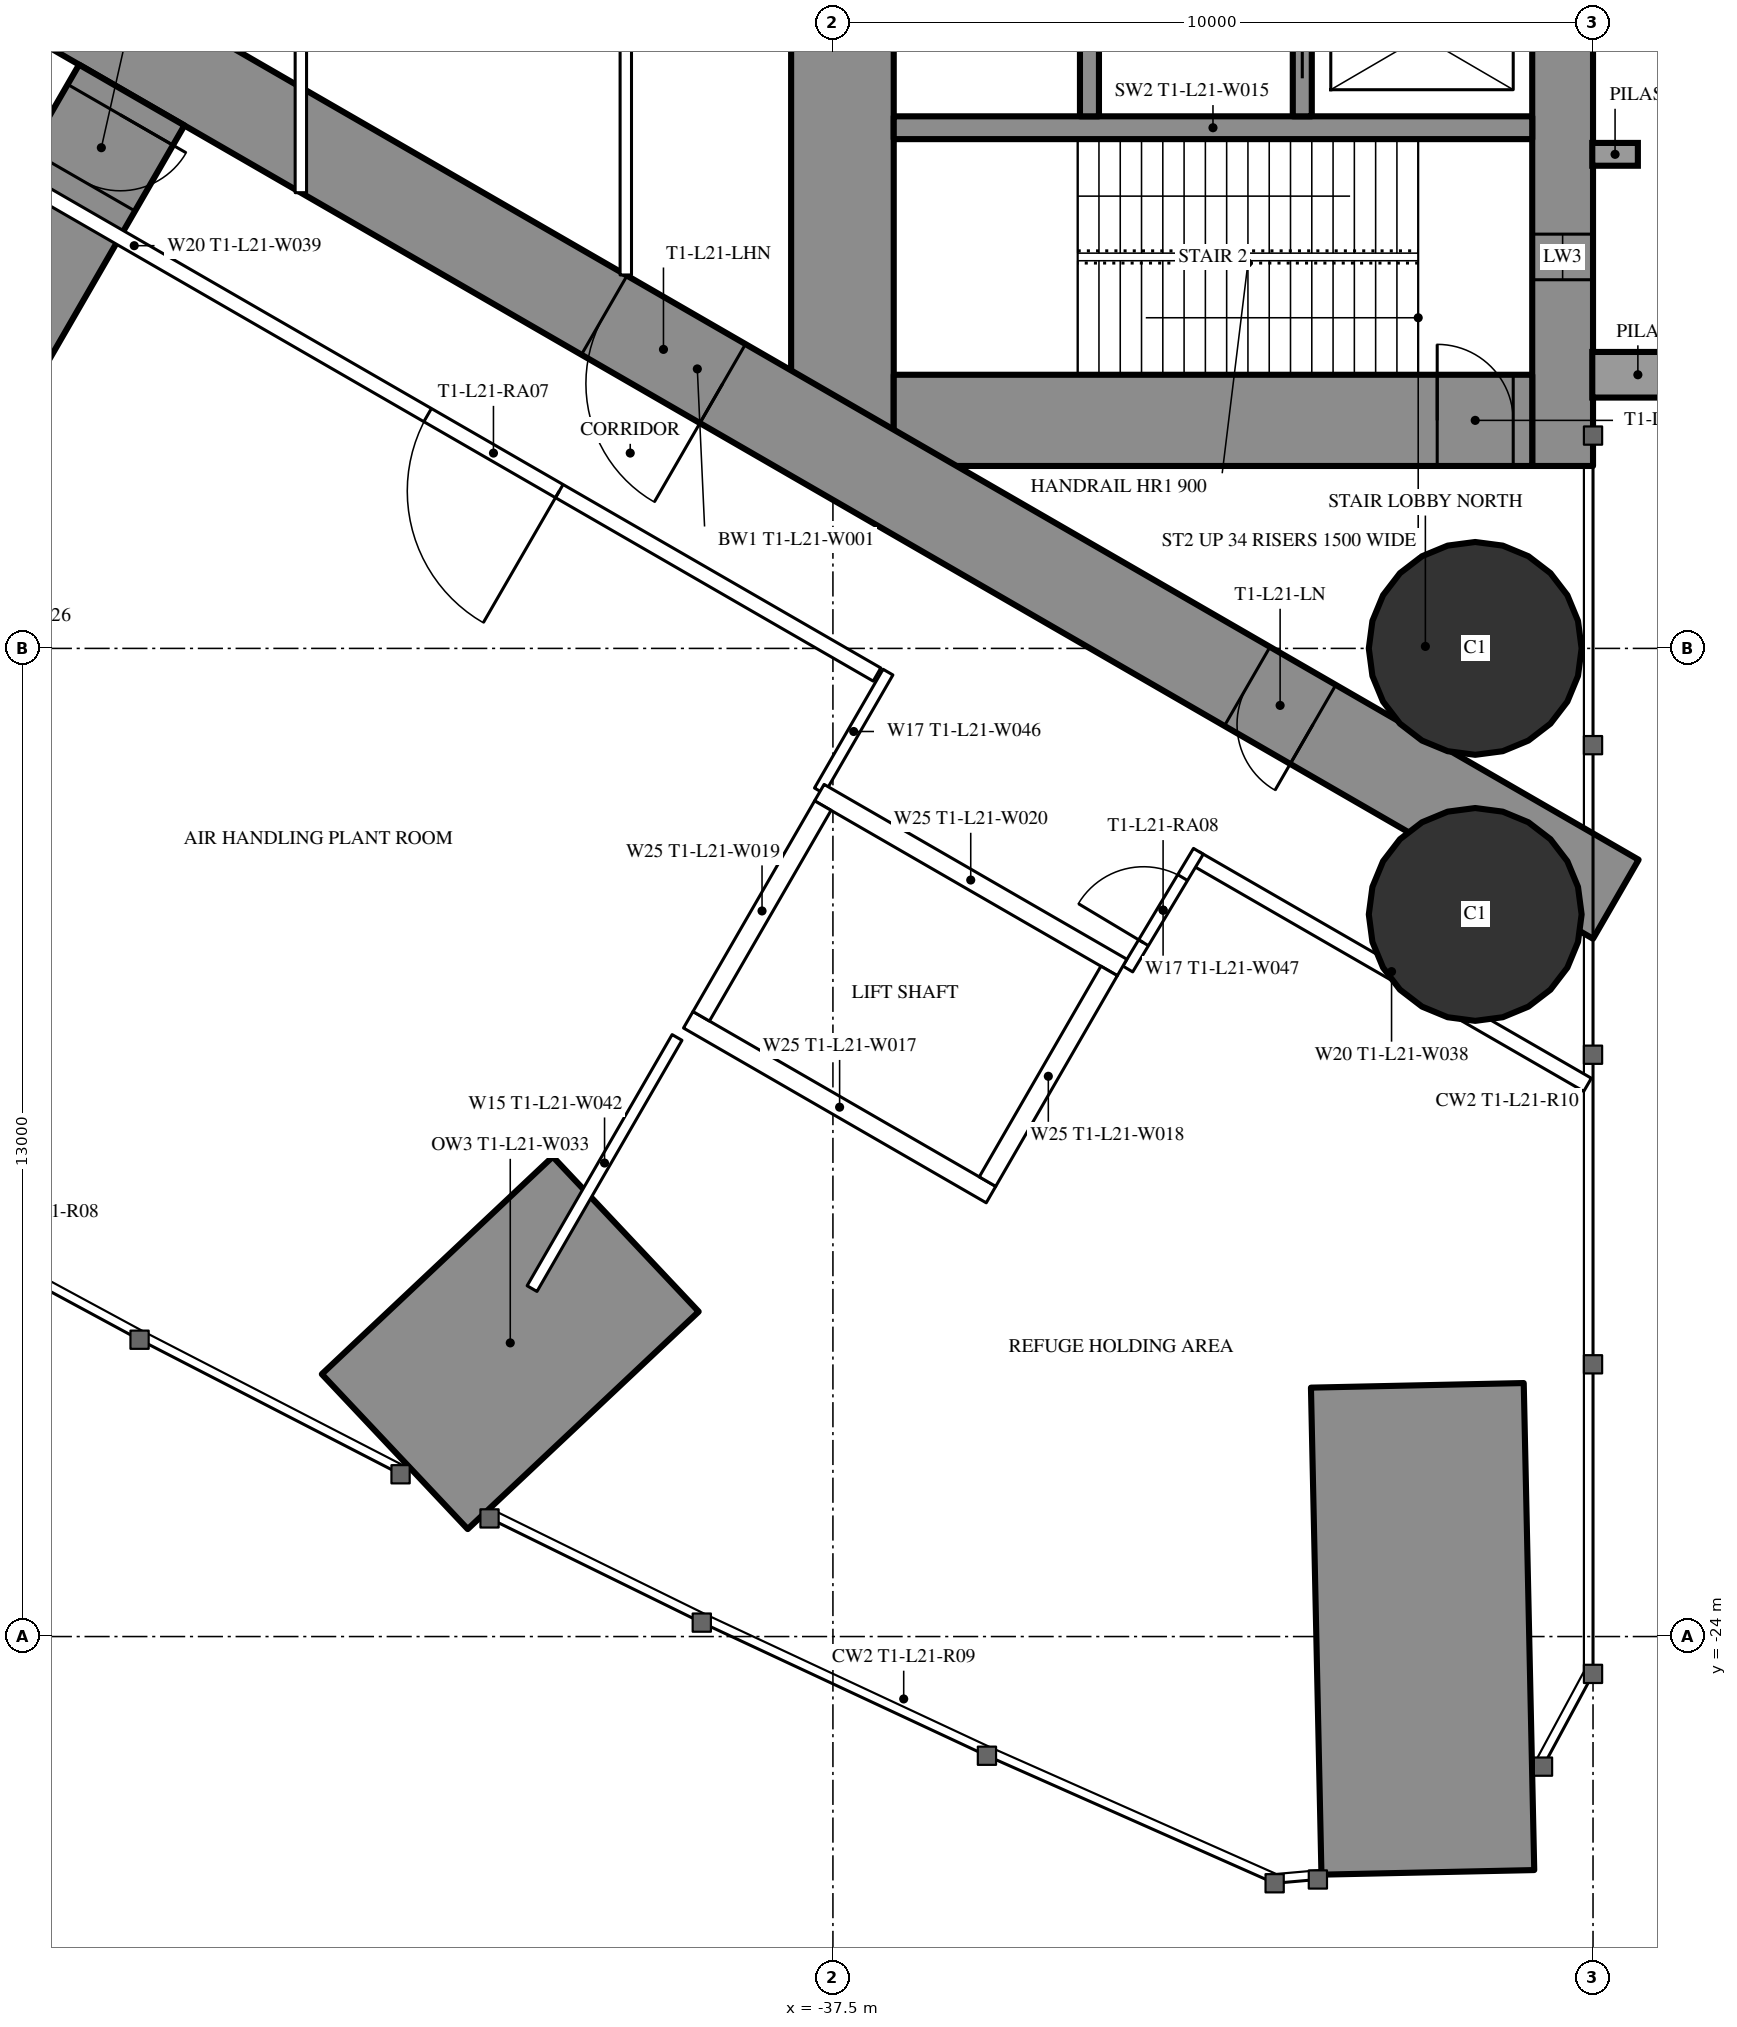
"""IFC4 building model, lengths in metres.
Left out: names, types, materials, properties, quantities, classifications, styles, units other than length and angle.
Written with IfcOpenShell. Run it as: python <this file> out.ifc"""

import sys

from ifc_helpers import new_model, si_unit, direction, frame, frame_2d, origin, origin_2d, place, context, subcontext, project, spatial, rectangle, hollow_circle, extrude, element, fill, save


model = new_model("IFC4")
c1 = context("Model", 3, precision=1e-05, world=origin(), true_north=direction((0.0, 1.0)))
c2 = subcontext(c1, "Body", "Model", "MODEL_VIEW")
j1 = project(units=[si_unit("LENGTHUNIT", "METRE"), si_unit("PLANEANGLEUNIT", "RADIAN")], contexts=[c1])
p1 = place(None, origin())
s1 = spatial("IfcSite", under=j1, at=p1, CompositionType="ELEMENT")
p2 = place(p1, origin())
s2 = spatial("IfcBuilding", under=s1, at=p2, CompositionType="ELEMENT")
p3 = place(p2, frame((0.0, 0.0, 81.0)))
s3 = spatial("IfcBuildingStorey", under=s2, at=p3, CompositionType="ELEMENT", Elevation=81.0)
p4 = place(p3, frame((-29.673, -27.102, 0.0), z_axis=(0.0, 0.0, 1.0), x_axis=(-0.0215618204, 0.999767516926, 0.0)))
e1 = element("IfcWall", 1, at=p4, inside=s3, PredefinedType="SHEAR", context=c2, shape_type="SweptSolid", body=[
    extrude(rectangle(XDim=6.409, YDim=2.8, at=frame_2d((3.204, 0.0))), origin(), (0.0, 0.0, 1.0), 6.0),
])
for number, where, z_axis, x_axis in (
    (2, (-29.05, -11.0, 0.0), (0.0, 0.0, 1.0), (1.0, 0.0, 0.0)),
    (3, (-29.05, -14.5, 0.0), (0.0, 0.0, 1.0), (1.0, 0.0, 0.0)),
):
    element("IfcColumn", number, at=place(p3, frame(where, z_axis=z_axis, x_axis=x_axis)), inside=s3, PredefinedType="COLUMN", context=c2, shape_type="SweptSolid", body=[
        extrude(hollow_circle(Radius=1.4, WallThickness=0.12, at=origin_2d()), origin(), (0.0, 0.0, 1.0), 6.0),
    ])
p5 = place(p3, frame((-43.265, -21.567, 0.0), z_axis=(0.0, 0.0, 1.0), x_axis=(0.728105540353, 0.685465040762, 0.0)))
e4 = element("IfcWall", 4, at=p5, inside=s3, PredefinedType="SHEAR", context=c2, shape_type="SweptSolid", body=[
    extrude(rectangle(XDim=4.174, YDim=2.8, at=frame_2d((2.087, 0.0))), origin(), (0.0, 0.0, 1.0), 6.0),
])
p6 = place(p3, frame((-27.9, 8.6, 0.0), z_axis=(0.0, 0.0, 1.0), x_axis=(0.0, -1.0, 0.0)))
e5 = element("IfcWall", 5, at=p6, inside=s3, PredefinedType="SHEAR", context=c2, shape_type="SweptSolid", body=[
    extrude(rectangle(XDim=17.2, YDim=0.8, at=frame_2d((8.6, 0.0))), origin(), (0.0, 0.0, 1.0), 6.0),
])
p7 = place(p6, frame((2.45, 0.0, 0.6)))
e6 = element("IfcOpeningElement", 6, at=p7, cuts=e5, PredefinedType="OPENING", context=c2, shape_type="SweptSolid", body=[
    extrude(rectangle(XDim=0.6, YDim=4.5, at=frame_2d((0.3, 2.25))), frame((0.0, 0.41, 0.0), z_axis=(0.0, -1.0, 0.0), x_axis=(1.0, 0.0, 0.0)), (0.0, 0.0, 1.0), 0.82),
])
p8 = place(p6, frame((14.15, 0.0, 0.6)))
e7 = element("IfcOpeningElement", 7, at=p8, cuts=e5, PredefinedType="OPENING", context=c2, shape_type="SweptSolid", body=[
    extrude(rectangle(XDim=0.6, YDim=4.5, at=frame_2d((0.3, 2.25))), frame((0.0, 0.41, 0.0), z_axis=(0.0, -1.0, 0.0), x_axis=(1.0, 0.0, 0.0)), (0.0, 0.0, 1.0), 0.82),
])
p9 = place(p3, frame((-37.375, 8.6, 0.0), z_axis=(0.0, 0.0, 1.0), x_axis=(0.0, -1.0, 0.0)))
e8 = element("IfcWall", 8, at=p9, inside=s3, PredefinedType="SHEAR", context=c2, shape_type="SweptSolid", body=[
    extrude(rectangle(XDim=17.2, YDim=1.35, at=frame_2d((8.6, 0.0))), origin(), (0.0, 0.0, 1.0), 6.0),
])
p10 = place(p9, frame((7.7, 0.0, 0.0)))
e9 = element("IfcOpeningElement", 9, at=p10, cuts=e8, PredefinedType="OPENING", context=c2, shape_type="SweptSolid", body=[
    extrude(rectangle(XDim=1.8, YDim=2.2, at=frame_2d((0.9, 1.1))), frame((0.0, 0.685, 0.0), z_axis=(0.0, -1.0, 0.0), x_axis=(1.0, 0.0, 0.0)), (0.0, 0.0, 1.0), 1.37),
])
p11 = place(p3, frame((-28.3, -8.0, 0.0), z_axis=(0.0, 0.0, 1.0), x_axis=(-1.0, 0.0, 0.0)))
e10 = element("IfcWall", 10, at=p11, inside=s3, PredefinedType="SHEAR", context=c2, shape_type="SweptSolid", body=[
    extrude(rectangle(XDim=8.4, YDim=1.2, at=frame_2d((4.2, 0.0))), origin(), (0.0, 0.0, 1.0), 6.0),
])
p12 = place(p11, frame((0.25, 0.0, 0.0)))
e11 = element("IfcOpeningElement", 11, at=p12, cuts=e10, PredefinedType="OPENING", context=c2, shape_type="SweptSolid", body=[
    extrude(rectangle(XDim=1.0, YDim=2.2, at=frame_2d((0.5, 1.1))), frame((0.0, 0.61, 0.0), z_axis=(0.0, -1.0, 0.0), x_axis=(1.0, 0.0, 0.0)), (0.0, 0.0, 1.0), 1.22),
])
p13 = place(p3, frame((-28.3, -4.15, 0.0), z_axis=(0.0, 0.0, 1.0), x_axis=(-1.0, 0.0, 0.0)))
e12 = element("IfcWall", 12, at=p13, inside=s3, PredefinedType="SHEAR", context=c2, shape_type="SweptSolid", body=[
    extrude(rectangle(XDim=8.4, YDim=0.3, at=frame_2d((4.2, 0.0))), origin(), (0.0, 0.0, 1.0), 6.0),
])
p14 = place(p3, frame((-31.325, -1.9, 0.0), z_axis=(0.0, 0.0, 1.0), x_axis=(0.0, -1.0, 0.0)))
e13 = element("IfcWall", 13, at=p14, inside=s3, PredefinedType="SHEAR", context=c2, shape_type="SweptSolid", body=[
    extrude(rectangle(XDim=2.1, YDim=0.25, at=frame_2d((1.05, 0.0))), origin(), (0.0, 0.0, 1.0), 6.0),
])
p15 = place(p14, frame((0.5, 0.0, 0.0)))
e14 = element("IfcOpeningElement", 14, at=p15, cuts=e13, PredefinedType="OPENING", context=c2, shape_type="SweptSolid", body=[
    extrude(rectangle(XDim=1.1, YDim=2.2, at=frame_2d((0.55, 1.1))), frame((0.0, 0.135, 0.0), z_axis=(0.0, -1.0, 0.0), x_axis=(1.0, 0.0, 0.0)), (0.0, 0.0, 1.0), 0.27),
])
p16 = place(p3, frame((-34.125, -1.65, 0.0), z_axis=(0.0, 0.0, 1.0), x_axis=(0.0, -1.0, 0.0)))
e15 = element("IfcWall", 15, at=p16, inside=s3, PredefinedType="SHEAR", context=c2, shape_type="SweptSolid", body=[
    extrude(rectangle(XDim=2.35, YDim=0.25, at=frame_2d((1.175, 0.0))), origin(), (0.0, 0.0, 1.0), 6.0),
])
p17 = place(p16, frame((0.875, 0.0, 0.0)))
e16 = element("IfcOpeningElement", 16, at=p17, cuts=e15, PredefinedType="OPENING", context=c2, shape_type="SweptSolid", body=[
    extrude(rectangle(XDim=0.6, YDim=2.0, at=frame_2d((0.3, 1.0))), frame((0.0, 0.135, 0.0), z_axis=(0.0, -1.0, 0.0), x_axis=(1.0, 0.0, 0.0)), (0.0, 0.0, 1.0), 0.27),
])
p18 = place(p3, frame((-27.2, -14.3, 0.0), z_axis=(0.0, 0.0, 1.0), x_axis=(-0.866024021859, 0.500002393557, 0.0)))
e17 = element("IfcWall", 17, at=p18, inside=s3, PredefinedType="SHEAR", context=c2, shape_type="SweptSolid", body=[
    extrude(rectangle(XDim=27.907, YDim=1.2, at=frame_2d((13.954, 0.0))), origin(), (0.0, 0.0, 1.0), 6.0),
])
p19 = place(p18, frame((4.6, 0.0, 0.0)))
e18 = element("IfcOpeningElement", 18, at=p19, cuts=e17, PredefinedType="OPENING", context=c2, shape_type="SweptSolid", body=[
    extrude(rectangle(XDim=1.0, YDim=2.2, at=frame_2d((0.5, 1.1))), frame((0.0, 0.61, 0.0), z_axis=(0.0, -1.0, 0.0), x_axis=(1.0, 0.0, 0.0)), (0.0, 0.0, 1.0), 1.22),
])
p20 = place(p18, frame((13.568, 0.0, 0.0)))
e19 = element("IfcOpeningElement", 19, at=p20, cuts=e17, PredefinedType="OPENING", context=c2, shape_type="SweptSolid", body=[
    extrude(rectangle(XDim=1.8, YDim=2.2, at=frame_2d((0.9, 1.1))), frame((0.0, 0.61, 0.0), z_axis=(0.0, -1.0, 0.0), x_axis=(1.0, 0.0, 0.0)), (0.0, 0.0, 1.0), 1.22),
])
p21 = place(p3, frame((-46.725, -3.72, 0.0), z_axis=(0.0, 0.0, 1.0), x_axis=(-0.500000237956, -0.866025266401, 0.0)))
e20 = element("IfcWall", 20, at=p21, inside=s3, PredefinedType="SHEAR", context=c2, shape_type="SweptSolid", body=[
    extrude(rectangle(XDim=12.73, YDim=1.6, at=frame_2d((6.365, 0.0))), origin(), (0.0, 0.0, 1.0), 6.0),
])
p22 = place(p21, frame((0.3, 0.0, 0.0)))
e21 = element("IfcOpeningElement", 21, at=p22, cuts=e20, PredefinedType="OPENING", context=c2, shape_type="SweptSolid", body=[
    extrude(rectangle(XDim=1.0, YDim=2.2, at=frame_2d((0.5, 1.1))), frame((0.0, 0.81, 0.0), z_axis=(0.0, -1.0, 0.0), x_axis=(1.0, 0.0, 0.0)), (0.0, 0.0, 1.0), 1.62),
])
p23 = place(p3, frame((-39.551, -16.118, 0.0), z_axis=(0.0, 0.0, 1.0), x_axis=(-0.499986503906, -0.866033195618, 0.0)))
e22 = element("IfcWall", 22, at=p23, inside=s3, PredefinedType="PARTITIONING", context=c2, shape_type="SweptSolid", body=[
    extrude(rectangle(XDim=3.815, YDim=0.15, at=frame_2d((1.907, 0.0))), origin(), (0.0, 0.0, 1.0), 5.75),
])
p24 = place(p3, frame((-27.572, -16.741, 0.0), z_axis=(0.0, 0.0, 1.0), x_axis=(-0.866024464444, 0.500001626982, 0.0)))
e23 = element("IfcWall", 23, at=p24, inside=s3, PredefinedType="PARTITIONING", context=c2, shape_type="SweptSolid", body=[
    extrude(rectangle(XDim=5.955, YDim=0.2, at=frame_2d((2.978, 0.0))), origin(), (0.0, 0.0, 1.0), 5.75),
])
p25 = place(p3, frame((-36.92, -11.344, 0.0), z_axis=(0.0, 0.0, 1.0), x_axis=(-0.866028313256, 0.499994960614, 0.0)))
e24 = element("IfcWall", 24, at=p25, inside=s3, PredefinedType="PARTITIONING", context=c2, shape_type="SweptSolid", body=[
    extrude(rectangle(XDim=22.568, YDim=0.2, at=frame_2d((11.284, 0.0))), origin(), (0.0, 0.0, 1.0), 5.75),
])
p26 = place(p25, frame((16.27, 0.0, 0.0)))
e25 = element("IfcOpeningElement", 25, at=p26, cuts=e24, PredefinedType="OPENING", context=c2, shape_type="SweptSolid", body=[
    extrude(rectangle(XDim=1.8, YDim=2.2, at=frame_2d((0.9, 1.1))), frame((0.0, 0.11, 0.0), z_axis=(0.0, -1.0, 0.0), x_axis=(1.0, 0.0, 0.0)), (0.0, 0.0, 1.0), 0.22),
])
p27 = place(p25, frame((4.826, 0.0, 0.0)))
e26 = element("IfcOpeningElement", 26, at=p27, cuts=e24, PredefinedType="OPENING", context=c2, shape_type="SweptSolid", body=[
    extrude(rectangle(XDim=2.0, YDim=2.4, at=frame_2d((1.0, 1.2))), frame((0.0, 0.11, 0.0), z_axis=(0.0, -1.0, 0.0), x_axis=(1.0, 0.0, 0.0)), (0.0, 0.0, 1.0), 0.22),
])
p28 = place(p3, frame((-36.776, -11.312, 0.0), z_axis=(0.0, 0.0, 1.0), x_axis=(-0.500038651731, -0.866003087047, 0.0)))
e27 = element("IfcWall", 27, at=p28, inside=s3, PredefinedType="PARTITIONING", context=c2, shape_type="SweptSolid", body=[
    extrude(rectangle(XDim=1.804, YDim=0.15, at=frame_2d((0.902, 0.0))), origin(), (0.0, 0.0, 1.0), 5.75),
])
p29 = place(p3, frame((-33.621, -15.218, 0.0), z_axis=(0.0, 0.0, 1.0), x_axis=(0.514336634837, 0.857588377991, 0.0)))
e28 = element("IfcWall", 28, at=p29, inside=s3, PredefinedType="PARTITIONING", context=c2, shape_type="SweptSolid", body=[
    extrude(rectangle(XDim=1.805, YDim=0.15, at=frame_2d((0.903, 0.0))), origin(), (0.0, 0.0, 1.0), 5.75),
])
p30 = place(p29, frame((0.403, 0.0, 0.0)))
e29 = element("IfcOpeningElement", 29, at=p30, cuts=e28, PredefinedType="OPENING", context=c2, shape_type="SweptSolid", body=[
    extrude(rectangle(XDim=1.0, YDim=2.2, at=frame_2d((0.5, 1.1))), frame((0.0, 0.085, 0.0), z_axis=(0.0, -1.0, 0.0), x_axis=(1.0, 0.0, 0.0)), (0.0, 0.0, 1.0), 0.17),
])
p31 = place(p3, frame((-40.225, 6.087, 0.0), z_axis=(0.0, 0.0, 1.0), x_axis=(0.0, -1.0, 0.0)))
e30 = element("IfcWall", 30, at=p31, inside=s3, PredefinedType="PARTITIONING", context=c2, shape_type="SweptSolid", body=[
    extrude(rectangle(XDim=12.174, YDim=0.15, at=frame_2d((6.087, 0.0))), origin(), (0.0, 0.0, 1.0), 5.75),
])
p32 = place(p31, frame((5.187, 0.0, 0.0)))
e31 = element("IfcOpeningElement", 31, at=p32, cuts=e30, PredefinedType="OPENING", context=c2, shape_type="SweptSolid", body=[
    extrude(rectangle(XDim=1.8, YDim=2.2, at=frame_2d((0.9, 1.1))), frame((0.0, 0.085, 0.0), z_axis=(0.0, -1.0, 0.0), x_axis=(1.0, 0.0, 0.0)), (0.0, 0.0, 1.0), 0.17),
])
p33 = place(p3, frame((-44.5, 5.005, 0.0), z_axis=(0.0, 0.0, 1.0), x_axis=(0.0, -1.0, 0.0)))
e32 = element("IfcWall", 32, at=p33, inside=s3, PredefinedType="PARTITIONING", context=c2, shape_type="SweptSolid", body=[
    extrude(rectangle(XDim=10.009, YDim=0.15, at=frame_2d((5.005, 0.0))), origin(), (0.0, 0.0, 1.0), 4.45),
])
p34 = place(p33, frame((4.505, 0.0, 0.0)))
e33 = element("IfcOpeningElement", 33, at=p34, cuts=e32, PredefinedType="OPENING", context=c2, shape_type="SweptSolid", body=[
    extrude(rectangle(XDim=1.0, YDim=2.2, at=frame_2d((0.5, 1.1))), frame((0.0, 0.085, 0.0), z_axis=(0.0, -1.0, 0.0), x_axis=(1.0, 0.0, 0.0)), (0.0, 0.0, 1.0), 0.17),
])
p35 = place(p3, frame((-33.696, -15.197, 0.0), z_axis=(0.0, 0.0, 1.0), x_axis=(-0.865976953817, 0.500083908417, 0.0)))
e34 = element("IfcWall", 34, at=p35, inside=s3, PredefinedType="PARTITIONING", context=c2, shape_type="SweptSolid", body=[
    extrude(rectangle(XDim=4.599, YDim=0.25, at=frame_2d((2.3, 0.0))), origin(), (0.0, 0.0, 1.0), 5.75),
])
p36 = place(p3, frame((-35.42, -18.186, 0.0), z_axis=(0.0, 0.0, 1.0), x_axis=(-0.865990227814, 0.50006092162, 0.0)))
e35 = element("IfcWall", 35, at=p36, inside=s3, PredefinedType="PARTITIONING", context=c2, shape_type="SweptSolid", body=[
    extrude(rectangle(XDim=4.6, YDim=0.25, at=frame_2d((2.3, 0.0))), origin(), (0.0, 0.0, 1.0), 5.75),
])
p37 = place(p3, frame((-33.866, -15.243, 0.0), z_axis=(0.0, 0.0, 1.0), x_axis=(-0.499929347863, -0.866066190972, 0.0)))
e36 = element("IfcWall", 36, at=p37, inside=s3, PredefinedType="PARTITIONING", context=c2, shape_type="SweptSolid", body=[
    extrude(rectangle(XDim=3.201, YDim=0.25, at=frame_2d((1.6, 0.0))), origin(), (0.0, 0.0, 1.0), 5.75),
])
p38 = place(p3, frame((-37.633, -13.068, 0.0), z_axis=(0.0, 0.0, 1.0), x_axis=(-0.499872130319, -0.866099216793, 0.0)))
e37 = element("IfcWall", 37, at=p38, inside=s3, PredefinedType="PARTITIONING", context=c2, shape_type="SweptSolid", body=[
    extrude(rectangle(XDim=3.2, YDim=0.25, at=frame_2d((1.6, 0.0))), origin(), (0.0, 0.0, 1.0), 5.75),
])
p39 = place(p22, origin())
e38 = element("IfcDoor", 38, at=p39, inside=s3, OperationType="SINGLE_SWING_LEFT", PredefinedType="DOOR", context=c2, shape_type="SweptSolid", body=[
    extrude(rectangle(XDim=1.0, YDim=2.2, at=frame_2d((0.5, 1.1))), frame((0.0, 0.025, 0.0), z_axis=(0.0, -1.0, 0.0), x_axis=(1.0, 0.0, 0.0)), (0.0, 0.0, 1.0), 0.05),
])
fill(e21, e38)
p40 = place(p27, origin())
e39 = element("IfcDoor", 39, at=p40, inside=s3, OperationType="DOUBLE_DOOR_SINGLE_SWING", PredefinedType="DOOR", context=c2, shape_type="SweptSolid", body=[
    extrude(rectangle(XDim=2.0, YDim=2.4, at=frame_2d((1.0, 1.2))), frame((0.0, 0.025, 0.0), z_axis=(0.0, -1.0, 0.0), x_axis=(1.0, 0.0, 0.0)), (0.0, 0.0, 1.0), 0.05),
])
fill(e26, e39)
p41 = place(p30, origin())
e40 = element("IfcDoor", 40, at=p41, inside=s3, OperationType="SINGLE_SWING_LEFT", PredefinedType="DOOR", context=c2, shape_type="SweptSolid", body=[
    extrude(rectangle(XDim=1.0, YDim=2.2, at=frame_2d((0.5, 1.1))), frame((0.0, 0.025, 0.0), z_axis=(0.0, -1.0, 0.0), x_axis=(1.0, 0.0, 0.0)), (0.0, 0.0, 1.0), 0.05),
])
fill(e29, e40)
p42 = place(p19, origin())
e41 = element("IfcDoor", 41, at=p42, inside=s3, OperationType="SINGLE_SWING_LEFT", PredefinedType="DOOR", context=c2, shape_type="SweptSolid", body=[
    extrude(rectangle(XDim=1.0, YDim=2.2, at=frame_2d((0.5, 1.1))), frame((0.0, 0.025, 0.0), z_axis=(0.0, -1.0, 0.0), x_axis=(1.0, 0.0, 0.0)), (0.0, 0.0, 1.0), 0.05),
])
fill(e18, e41)
p43 = place(p20, origin())
e42 = element("IfcDoor", 42, at=p43, inside=s3, OperationType="DOUBLE_DOOR_SINGLE_SWING", PredefinedType="DOOR", context=c2, shape_type="SweptSolid", body=[
    extrude(rectangle(XDim=1.8, YDim=2.2, at=frame_2d((0.9, 1.1))), frame((0.0, 0.025, 0.0), z_axis=(0.0, -1.0, 0.0), x_axis=(1.0, 0.0, 0.0)), (0.0, 0.0, 1.0), 0.05),
])
fill(e19, e42)
p44 = place(p12, origin())
e43 = element("IfcDoor", 43, at=p44, inside=s3, OperationType="SINGLE_SWING_RIGHT", PredefinedType="DOOR", context=c2, shape_type="SweptSolid", body=[
    extrude(rectangle(XDim=1.0, YDim=2.2, at=frame_2d((0.5, 1.1))), frame((0.0, 0.025, 0.0), z_axis=(0.0, -1.0, 0.0), x_axis=(1.0, 0.0, 0.0)), (0.0, 0.0, 1.0), 0.05),
])
fill(e11, e43)
p45 = place(p15, origin())
e44 = element("IfcDoor", 44, at=p45, inside=s3, OperationType="SLIDING_TO_LEFT", PredefinedType="USERDEFINED", context=c2, shape_type="SweptSolid", body=[
    extrude(rectangle(XDim=1.1, YDim=2.2, at=frame_2d((0.55, 1.1))), frame((0.0, 0.025, 0.0), z_axis=(0.0, -1.0, 0.0), x_axis=(1.0, 0.0, 0.0)), (0.0, 0.0, 1.0), 0.05),
])
fill(e14, e44)
p46 = place(p8, origin())
e45 = element("IfcWindow", 45, at=p46, inside=s3, PartitioningType="SINGLE_PANEL", PredefinedType="WINDOW", context=c2, shape_type="SweptSolid", body=[
    extrude(rectangle(XDim=0.6, YDim=4.5, at=frame_2d((0.3, 2.25))), frame((0.0, 0.03, 0.0), z_axis=(0.0, -1.0, 0.0), x_axis=(1.0, 0.0, 0.0)), (0.0, 0.0, 1.0), 0.06),
])
fill(e7, e45)
save(model, sys.argv[1])
